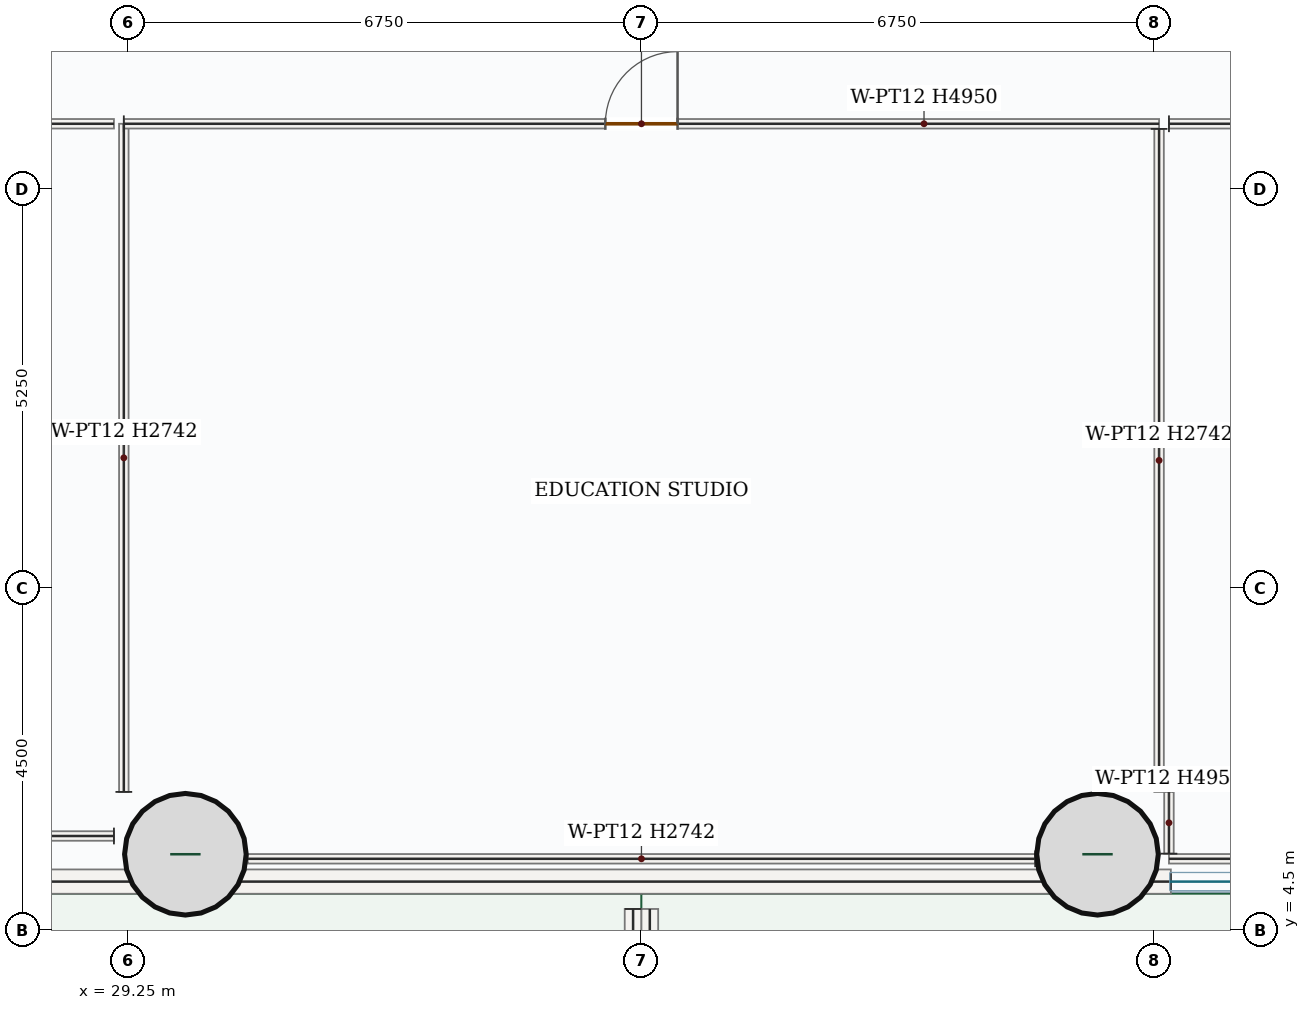
"""IFC4 building model, lengths in metres.
Left out: names, types, materials, properties, quantities, classifications, styles, units other than length and angle.
Written with IfcOpenShell. Run it as: python <this file> out.ifc"""

import sys

from ifc_helpers import new_model, si_unit, direction, frame, frame_2d, origin, origin_2d, place, context, subcontext, project, spatial, rectangle, hollow_circle, extrude, source, transform, mapped, element, fill, save


model = new_model("IFC4")
c1 = context("Model", 3, precision=1e-05, world=origin(), true_north=direction((0.0, 1.0)))
c2 = subcontext(c1, "Body", "Model", "MODEL_VIEW")
j1 = project(units=[si_unit("LENGTHUNIT", "METRE"), si_unit("PLANEANGLEUNIT", "RADIAN")], contexts=[c1])
p1 = place(None, origin())
s1 = spatial("IfcSite", under=j1, at=p1, CompositionType="ELEMENT")
p2 = place(p1, origin())
s2 = spatial("IfcBuilding", under=s1, at=p2, CompositionType="ELEMENT")
p3 = place(p2, frame((0.0, 0.0, 18.0)))
s3 = spatial("IfcBuildingStorey", under=s2, at=p3, CompositionType="ELEMENT", Elevation=18.0)
m1 = source(origin(), c2, "Body", "SweptSolid", [
    extrude(hollow_circle(Radius=0.8, WallThickness=0.06, at=origin_2d()), origin(), (0.0, 0.0, 1.0), 5.4),
])
for number, where, z_axis, x_axis in (
    (1, (30.0, 5.5, 0.0), (0.0, 0.0, 1.0), (1.0, 0.0, 0.0)),
    (2, (42.0, 5.5, 0.0), (0.0, 0.0, 1.0), (1.0, 0.0, 0.0)),
):
    element("IfcColumn", number, at=place(p3, frame(where, z_axis=z_axis, x_axis=x_axis)), inside=s3, PredefinedType="COLUMN", context=c2, shape_type="MappedRepresentation", body=[
        mapped(m1, transform((0.0, 0.0, 0.0), x_axis=(1.0, 0.0, 0.0), y_axis=(0.0, 1.0, 0.0), z_axis=(0.0, 0.0, 1.0), scale=1.0)),
    ])
m2 = source(origin(), c2, "Body", "SweptSolid", [
    extrude(rectangle(XDim=1.67, YDim=0.22, at=frame_2d((0.835, 0.0))), origin(), (0.0, 0.0, 1.0), 1.2),
])
for number, where, z_axis, x_axis in (
    (3, (35.89, 4.78, 0.0), (0.0, 0.0, 1.0), (0.0, -1.0, 0.0)),
    (4, (36.11, 3.11, 0.0), (0.0, 0.0, 1.0), (0.0, 1.0, 0.0)),
):
    element("IfcWall", number, at=place(p3, frame(where, z_axis=z_axis, x_axis=x_axis)), inside=s3, PredefinedType="PARAPET", context=c2, shape_type="MappedRepresentation", body=[
        mapped(m2, transform((0.0, 0.0, 0.0), x_axis=(1.0, 0.0, 0.0), y_axis=(0.0, 1.0, 0.0), z_axis=(0.0, 0.0, 1.0), scale=1.0)),
    ])
m3 = source(origin(), c2, "Body", "SweptSolid", [
    extrude(rectangle(XDim=35.625, YDim=0.32, at=frame_2d((17.812, 0.0))), origin(), (0.0, 0.0, 1.0), 2.742),
])
p4 = place(p3, frame((42.965, 5.14, 0.0), z_axis=(0.0, 0.0, 1.0), x_axis=(-1.0, 0.0, 0.0)))
e5 = element("IfcWall", 5, at=p4, inside=s3, PredefinedType="SOLIDWALL", context=c2, shape_type="MappedRepresentation", body=[
    mapped(m3, transform((0.0, 0.0, 0.0), x_axis=(1.0, 0.0, 0.0), y_axis=(0.0, 1.0, 0.0), z_axis=(0.0, 0.0, 1.0), scale=1.0)),
])
m4 = source(origin(), c2, "Body", "SweptSolid", [
    extrude(rectangle(XDim=10.36, YDim=0.125, at=frame_2d((5.18, 0.0))), origin(), (0.0, 0.0, 1.0), 2.742),
])
p5 = place(p3, frame((41.18, 5.44, 0.0), z_axis=(0.0, 0.0, 1.0), x_axis=(-1.0, 0.0, 0.0)))
e6 = element("IfcWall", 6, at=p5, inside=s3, PredefinedType="PARTITIONING", context=c2, shape_type="MappedRepresentation", body=[
    mapped(m4, transform((0.0, 0.0, 0.0), x_axis=(1.0, 0.0, 0.0), y_axis=(0.0, 1.0, 0.0), z_axis=(0.0, 0.0, 1.0), scale=1.0)),
])
m5 = source(origin(), c2, "Body", "SweptSolid", [
    extrude(rectangle(XDim=8.79, YDim=0.125, at=frame_2d((4.395, 0.0))), origin(), (0.0, 0.0, 1.0), 2.742),
])
p6 = place(p3, frame((29.19, 6.32, 0.0), z_axis=(0.0, 0.0, 1.0), x_axis=(0.0, 1.0, 0.0)))
e7 = element("IfcWall", 7, at=p6, inside=s3, PredefinedType="PARTITIONING", context=c2, shape_type="MappedRepresentation", body=[
    mapped(m5, transform((0.0, 0.0, 0.0), x_axis=(1.0, 0.0, 0.0), y_axis=(0.0, 1.0, 0.0), z_axis=(0.0, 0.0, 1.0), scale=1.0)),
])
p7 = place(p3, frame((29.19, 15.11, 0.0), z_axis=(0.0, 0.0, 1.0), x_axis=(1.0, 0.0, 0.0)))
e8 = element("IfcWall", 8, at=p7, inside=s3, PredefinedType="PARTITIONING", context=c2, shape_type="SweptSolid", body=[
    extrude(rectangle(XDim=13.62, YDim=0.125, at=frame_2d((6.81, 0.0))), origin(), (0.0, 0.0, 1.0), 4.95),
])
p8 = place(p7, frame((6.335, 0.0, 0.0)))
e9 = element("IfcOpeningElement", 9, at=p8, cuts=e8, PredefinedType="OPENING", context=c2, shape_type="SweptSolid", body=[
    extrude(rectangle(XDim=0.95, YDim=2.15, at=frame_2d((0.475, 1.075))), frame((0.0, 0.073, 0.0), z_axis=(0.0, -1.0, 0.0), x_axis=(1.0, 0.0, 0.0)), (0.0, 0.0, 1.0), 0.145),
])
m6 = source(origin(), c2, "Body", "SweptSolid", [
    extrude(rectangle(XDim=8.722, YDim=0.125, at=frame_2d((4.361, 0.0))), origin(), (0.0, 0.0, 1.0), 2.742),
])
p9 = place(p3, frame((42.81, 15.042, 0.0), z_axis=(0.0, 0.0, 1.0), x_axis=(0.0, -1.0, 0.0)))
e10 = element("IfcWall", 10, at=p9, inside=s3, PredefinedType="PARTITIONING", context=c2, shape_type="MappedRepresentation", body=[
    mapped(m6, transform((0.0, 0.0, 0.0), x_axis=(1.0, 0.0, 0.0), y_axis=(0.0, 1.0, 0.0), z_axis=(0.0, 0.0, 1.0), scale=1.0)),
])
m7 = source(origin(), c2, "Body", "SweptSolid", [
    extrude(rectangle(XDim=21.555, YDim=0.125, at=frame_2d((10.778, 0.0))), origin(), (0.0, 0.0, 1.0), 2.742),
])
p10 = place(p3, frame((29.06, 5.74, 0.0), z_axis=(0.0, 0.0, 1.0), x_axis=(-1.0, 0.0, 0.0)))
e11 = element("IfcWall", 11, at=p10, inside=s3, PredefinedType="PARTITIONING", context=c2, shape_type="MappedRepresentation", body=[
    mapped(m7, transform((0.0, 0.0, 0.0), x_axis=(1.0, 0.0, 0.0), y_axis=(0.0, 1.0, 0.0), z_axis=(0.0, 0.0, 1.0), scale=1.0)),
])
m8 = source(origin(), c2, "Body", "SweptSolid", [
    extrude(rectangle(XDim=6.554, YDim=0.125, at=frame_2d((3.277, 0.0))), origin(), (0.0, 0.0, 1.0), 4.95),
])
p11 = place(p3, frame((22.506, 15.11, 0.0), z_axis=(0.0, 0.0, 1.0), x_axis=(1.0, 0.0, 0.0)))
e12 = element("IfcWall", 12, at=p11, inside=s3, PredefinedType="PARTITIONING", context=c2, shape_type="MappedRepresentation", body=[
    mapped(m8, transform((0.0, 0.0, 0.0), x_axis=(1.0, 0.0, 0.0), y_axis=(0.0, 1.0, 0.0), z_axis=(0.0, 0.0, 1.0), scale=1.0)),
])
p12 = place(p3, frame((64.495, 5.44, 0.0), z_axis=(0.0, 0.0, 1.0), x_axis=(-1.0, 0.0, 0.0)))
e13 = element("IfcWall", 13, at=p12, inside=s3, PredefinedType="PARTITIONING", context=c2, shape_type="MappedRepresentation", body=[
    mapped(m7, transform((0.0, 0.0, 0.0), x_axis=(1.0, 0.0, 0.0), y_axis=(0.0, 1.0, 0.0), z_axis=(0.0, 0.0, 1.0), scale=1.0)),
])
m9 = source(origin(), c2, "Body", "SweptSolid", [
    extrude(rectangle(XDim=0.812, YDim=0.125, at=frame_2d((0.406, 0.0))), origin(), (0.0, 0.0, 1.0), 4.95),
])
p13 = place(p3, frame((42.94, 5.508, 0.0), z_axis=(0.0, 0.0, 1.0), x_axis=(0.0, 1.0, 0.0)))
e14 = element("IfcWall", 14, at=p13, inside=s3, PredefinedType="PARTITIONING", context=c2, shape_type="MappedRepresentation", body=[
    mapped(m9, transform((0.0, 0.0, 0.0), x_axis=(1.0, 0.0, 0.0), y_axis=(0.0, 1.0, 0.0), z_axis=(0.0, 0.0, 1.0), scale=1.0)),
])
p14 = place(p3, frame((42.94, 15.11, 0.0), z_axis=(0.0, 0.0, 1.0), x_axis=(1.0, 0.0, 0.0)))
e15 = element("IfcWall", 15, at=p14, inside=s3, PredefinedType="PARTITIONING", context=c2, shape_type="MappedRepresentation", body=[
    mapped(m8, transform((0.0, 0.0, 0.0), x_axis=(1.0, 0.0, 0.0), y_axis=(0.0, 1.0, 0.0), z_axis=(0.0, 0.0, 1.0), scale=1.0)),
])
m10 = source(origin(), c2, "Body", "SweptSolid", [
    extrude(rectangle(XDim=0.95, YDim=2.15, at=frame_2d((0.475, 1.075))), frame((0.0, 0.025, 0.0), z_axis=(0.0, -1.0, 0.0), x_axis=(1.0, 0.0, 0.0)), (0.0, 0.0, 1.0), 0.05),
])
p15 = place(p8, origin())
e16 = element("IfcDoor", 16, at=p15, inside=s3, OperationType="SINGLE_SWING_RIGHT", PredefinedType="DOOR", context=c2, shape_type="MappedRepresentation", body=[
    mapped(m10, transform((0.0, 0.0, 0.0), x_axis=(1.0, 0.0, 0.0), y_axis=(0.0, 1.0, 0.0), z_axis=(0.0, 0.0, 1.0), scale=1.0)),
])
fill(e9, e16)
save(model, sys.argv[1])
